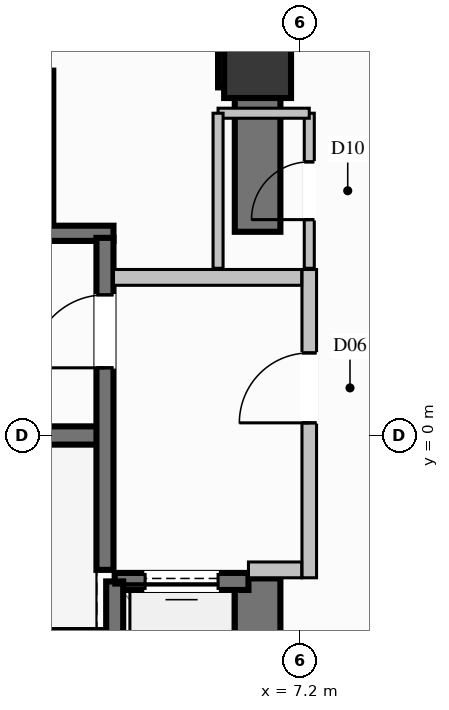
"""IFC4 building model, lengths in metres.
Left out: names, types, materials, properties, quantities, classifications, styles, units other than length and angle.
Written with IfcOpenShell. Run it as: python <this file> out.ifc"""

import sys

from ifc_helpers import new_model, si_unit, direction, frame, frame_2d, origin, origin_2d, place, context, subcontext, project, spatial, rectangle, extrude, element, fill, save


model = new_model("IFC4")
c1 = context("Model", 3, precision=1e-05, world=origin(), true_north=direction((0.0, 1.0)))
c2 = subcontext(c1, "Body", "Model", "MODEL_VIEW")
j1 = project(units=[si_unit("LENGTHUNIT", "METRE"), si_unit("PLANEANGLEUNIT", "RADIAN")], contexts=[c1])
p1 = place(None, origin())
s1 = spatial("IfcSite", under=j1, at=p1, CompositionType="ELEMENT")
p2 = place(p1, origin())
s2 = spatial("IfcBuilding", under=s1, at=p2, CompositionType="ELEMENT")
p3 = place(p2, frame((0.0, 0.0, 28.4)))
s3 = spatial("IfcBuildingStorey", under=s2, at=p3, CompositionType="ELEMENT", Elevation=28.4)
p4 = place(p3, frame((6.5, 6.1, 0.0), z_axis=(0.0, 0.0, 1.0), x_axis=(1.0, 0.0, 0.0)))
e1 = element("IfcColumn", 1, at=p4, inside=s3, PredefinedType="COLUMN", context=c2, shape_type="SweptSolid", body=[
    extrude(rectangle(XDim=1.1, YDim=1.1, at=origin_2d()), origin(), (0.0, 0.0, 1.0), 3.6),
])
p5 = place(p3, frame((-3.99, 0.0, 0.0), z_axis=(0.0, 0.0, 1.0), x_axis=(1.0, 0.0, 0.0)))
e2 = element("IfcWall", 2, at=p5, inside=s3, PredefinedType="SHEAR", context=c2, shape_type="SweptSolid", body=[
    extrude(rectangle(XDim=7.98, YDim=0.3, at=frame_2d((3.99, 0.0))), origin(), (0.0, 0.0, 1.0), 3.6),
])
for number, where, z_axis, x_axis in (
    (3, (-4.13, -3.325, 0.0), (0.0, 0.0, 1.0), (1.0, 0.0, 0.0)),
    (4, (-4.13, 3.325, 0.0), (0.0, 0.0, 1.0), (1.0, 0.0, 0.0)),
):
    element("IfcWall", number, at=place(p3, frame(where, z_axis=z_axis, x_axis=x_axis)), inside=s3, PredefinedType="SOLIDWALL", context=c2, shape_type="SweptSolid", body=[
        extrude(rectangle(XDim=8.26, YDim=0.25, at=frame_2d((4.13, 0.0))), origin(), (0.0, 0.0, 1.0), 3.6),
    ])
p6 = place(p3, frame((5.85, 6.1, 0.0), z_axis=(0.0, 0.0, 1.0), x_axis=(1.0, 0.0, 0.0)))
e5 = element("IfcWall", 5, at=p6, inside=s3, PredefinedType="SHEAR", context=c2, shape_type="SweptSolid", body=[
    extrude(rectangle(XDim=0.275, YDim=0.75, at=frame_2d((0.137, 0.0))), origin(), (0.0, 0.0, 1.0), 3.6),
])
p7 = place(p3, frame((6.5, -6.475, 0.0), z_axis=(0.0, 0.0, 1.0), x_axis=(0.0, 1.0, 0.0)))
e6 = element("IfcWall", 6, at=p7, inside=s3, PredefinedType="SHEAR", context=c2, shape_type="SweptSolid", body=[
    extrude(rectangle(XDim=4.125, YDim=0.75, at=frame_2d((2.062, 0.0))), origin(), (0.0, 0.0, 1.0), 3.6),
])
p8 = place(p3, frame((6.5, 3.35, 0.0), z_axis=(0.0, 0.0, 1.0), x_axis=(0.0, 1.0, 0.0)))
e7 = element("IfcWall", 7, at=p8, inside=s3, PredefinedType="SHEAR", context=c2, shape_type="SweptSolid", body=[
    extrude(rectangle(XDim=3.125, YDim=0.75, at=frame_2d((1.562, 0.0))), origin(), (0.0, 0.0, 1.0), 3.6),
])
p9 = place(p3, frame((3.0, 3.5, 0.0), z_axis=(0.0, 0.0, 1.0), x_axis=(0.0, 1.0, 0.0)))
e8 = element("IfcWall", 8, at=p9, inside=s3, PredefinedType="SOLIDWALL", context=c2, shape_type="SweptSolid", body=[
    extrude(rectangle(XDim=2.5, YDim=0.28, at=frame_2d((1.25, 0.0))), origin(), (0.0, 0.0, 1.0), 3.34),
])
p10 = place(p3, frame((6.35, -2.4, 0.0), z_axis=(0.0, 0.0, 1.0), x_axis=(-1.0, 0.0, 0.0)))
e9 = element("IfcWall", 9, at=p10, inside=s3, PredefinedType="SOLIDWALL", context=c2, shape_type="SweptSolid", body=[
    extrude(rectangle(XDim=2.2, YDim=0.28, at=frame_2d((1.1, 0.0))), origin(), (0.0, 0.0, 1.0), 3.34),
])
p11 = place(p10, frame((0.5, 0.0, 0.0)))
e10 = element("IfcOpeningElement", 10, at=p11, cuts=e9, PredefinedType="OPENING", context=c2, shape_type="SweptSolid", body=[
    extrude(rectangle(XDim=1.2, YDim=2.2, at=frame_2d((0.6, 1.1))), frame((0.0, 0.15, 0.0), z_axis=(0.0, -1.0, 0.0), x_axis=(1.0, 0.0, 0.0)), (0.0, 0.0, 1.0), 0.3),
])
p12 = place(p3, frame((4.15, -2.4, 0.0), z_axis=(0.0, 0.0, 1.0), x_axis=(0.0, -1.0, 0.0)))
e11 = element("IfcWall", 11, at=p12, inside=s3, PredefinedType="SOLIDWALL", context=c2, shape_type="SweptSolid", body=[
    extrude(rectangle(XDim=2.7, YDim=0.28, at=frame_2d((1.35, 0.0))), origin(), (0.0, 0.0, 1.0), 3.34),
])
p13 = place(p3, frame((3.99, -2.21, 0.0), z_axis=(0.0, 0.0, 1.0), x_axis=(0.0, 1.0, 0.0)))
e12 = element("IfcWall", 12, at=p13, inside=s3, PredefinedType="SOLIDWALL", context=c2, shape_type="SweptSolid", body=[
    extrude(rectangle(XDim=5.46, YDim=0.28, at=frame_2d((2.73, 0.0))), origin(), (0.0, 0.0, 1.0), 3.34),
])
p14 = place(p13, frame((3.323, 0.0, 0.0)))
e13 = element("IfcOpeningElement", 13, at=p14, cuts=e12, PredefinedType="OPENING", context=c2, shape_type="SweptSolid", body=[
    extrude(rectangle(XDim=1.2, YDim=2.2, at=frame_2d((0.6, 1.1))), frame((0.0, 0.15, 0.0), z_axis=(0.0, -1.0, 0.0), x_axis=(1.0, 0.0, 0.0)), (0.0, 0.0, 1.0), 0.3),
])
p15 = place(p3, frame((7.35, -2.34, 0.0), z_axis=(0.0, 0.0, 1.0), x_axis=(0.0, 1.0, 0.0)))
e14 = element("IfcWall", 14, at=p15, inside=s3, PredefinedType="PARTITIONING", context=c2, shape_type="SweptSolid", body=[
    extrude(rectangle(XDim=5.07, YDim=0.24, at=frame_2d((2.535, 0.0))), origin(), (0.0, 0.0, 1.0), 2.425),
])
p16 = place(p15, frame((2.548, 0.0, 0.0)))
e15 = element("IfcOpeningElement", 15, at=p16, cuts=e14, PredefinedType="OPENING", context=c2, shape_type="SweptSolid", body=[
    extrude(rectangle(XDim=1.15, YDim=2.2, at=frame_2d((0.575, 1.1))), frame((0.0, 0.13, 0.0), z_axis=(0.0, -1.0, 0.0), x_axis=(1.0, 0.0, 0.0)), (0.0, 0.0, 1.0), 0.26),
])
p17 = place(p3, frame((6.35, -2.21, 0.0), z_axis=(0.0, 0.0, 1.0), x_axis=(1.0, 0.0, 0.0)))
e16 = element("IfcWall", 16, at=p17, inside=s3, PredefinedType="PARTITIONING", context=c2, shape_type="SweptSolid", body=[
    extrude(rectangle(XDim=0.875, YDim=0.26, at=frame_2d((0.438, 0.0))), origin(), (0.0, 0.0, 1.0), 3.34),
])
p18 = place(p3, frame((4.13, 2.6, 0.0), z_axis=(0.0, 0.0, 1.0), x_axis=(1.0, 0.0, 0.0)))
e17 = element("IfcWall", 17, at=p18, inside=s3, PredefinedType="PARTITIONING", context=c2, shape_type="SweptSolid", body=[
    extrude(rectangle(XDim=3.095, YDim=0.26, at=frame_2d((1.548, 0.0))), origin(), (0.0, 0.0, 1.0), 3.34),
])
p19 = place(p3, frame((7.35, 2.75, 0.0), z_axis=(0.0, 0.0, 1.0), x_axis=(0.0, 1.0, 0.0)))
e18 = element("IfcWall", 18, at=p19, inside=s3, PredefinedType="PARTITIONING", context=c2, shape_type="SweptSolid", body=[
    extrude(rectangle(XDim=2.55, YDim=0.165, at=frame_2d((1.275, 0.0))), origin(), (0.0, 0.0, 1.0), 3.34),
])
p20 = place(p19, frame((0.8, 0.0, 0.0)))
e19 = element("IfcOpeningElement", 19, at=p20, cuts=e18, PredefinedType="OPENING", context=c2, shape_type="SweptSolid", body=[
    extrude(rectangle(XDim=0.95, YDim=2.1, at=frame_2d((0.475, 1.05))), frame((0.0, 0.093, 0.0), z_axis=(0.0, -1.0, 0.0), x_axis=(1.0, 0.0, 0.0)), (0.0, 0.0, 1.0), 0.185),
])
p21 = place(p3, frame((7.35, 5.3, 0.0), z_axis=(0.0, 0.0, 1.0), x_axis=(-1.0, 0.0, 0.0)))
e20 = element("IfcWall", 20, at=p21, inside=s3, PredefinedType="PARTITIONING", context=c2, shape_type="SweptSolid", body=[
    extrude(rectangle(XDim=1.5, YDim=0.165, at=frame_2d((0.75, 0.0))), origin(), (0.0, 0.0, 1.0), 2.425),
])
p22 = place(p3, frame((5.85, 5.3, 0.0), z_axis=(0.0, 0.0, 1.0), x_axis=(0.0, -1.0, 0.0)))
e21 = element("IfcWall", 21, at=p22, inside=s3, PredefinedType="PARTITIONING", context=c2, shape_type="SweptSolid", body=[
    extrude(rectangle(XDim=2.55, YDim=0.165, at=frame_2d((1.275, 0.0))), origin(), (0.0, 0.0, 1.0), 2.425),
])
p23 = place(p3, frame((10.566, 5.975, 0.0), z_axis=(0.0, 0.0, 1.0), x_axis=(-0.714411174131, 0.699726142342, 0.0)))
e22 = element("IfcWall", 22, at=p23, inside=s3, PredefinedType="PARTITIONING", context=c2, shape_type="SweptSolid", body=[
    extrude(rectangle(XDim=6.251, YDim=0.24, at=frame_2d((3.125, 0.0))), origin(), (0.0, 0.0, 1.0), 3.34),
])
p24 = place(p11, origin())
e23 = element("IfcDoor", 23, at=p24, inside=s3, OperationType="SLIDING_TO_LEFT", PredefinedType="DOOR", context=c2, shape_type="SweptSolid", body=[
    extrude(rectangle(XDim=1.2, YDim=2.2, at=frame_2d((0.6, 1.1))), frame((0.0, 0.025, 0.0), z_axis=(0.0, -1.0, 0.0), x_axis=(1.0, 0.0, 0.0)), (0.0, 0.0, 1.0), 0.05),
])
fill(e10, e23)
p25 = place(p14, origin())
e24 = element("IfcDoor", 24, at=p25, inside=s3, OperationType="SINGLE_SWING_LEFT", PredefinedType="DOOR", context=c2, shape_type="SweptSolid", body=[
    extrude(rectangle(XDim=1.2, YDim=2.2, at=frame_2d((0.6, 1.1))), frame((0.0, 0.025, 0.0), z_axis=(0.0, -1.0, 0.0), x_axis=(1.0, 0.0, 0.0)), (0.0, 0.0, 1.0), 0.05),
])
fill(e13, e24)
p26 = place(p16, origin())
e25 = element("IfcDoor", 25, at=p26, inside=s3, OperationType="SINGLE_SWING_LEFT", PredefinedType="DOOR", context=c2, shape_type="SweptSolid", body=[
    extrude(rectangle(XDim=1.15, YDim=2.2, at=frame_2d((0.575, 1.1))), frame((0.0, 0.025, 0.0), z_axis=(0.0, -1.0, 0.0), x_axis=(1.0, 0.0, 0.0)), (0.0, 0.0, 1.0), 0.05),
])
fill(e15, e25)
p27 = place(p20, origin())
e26 = element("IfcDoor", 26, at=p27, inside=s3, OperationType="SINGLE_SWING_LEFT", PredefinedType="DOOR", context=c2, shape_type="SweptSolid", body=[
    extrude(rectangle(XDim=0.95, YDim=2.1, at=frame_2d((0.475, 1.05))), frame((0.0, 0.025, 0.0), z_axis=(0.0, -1.0, 0.0), x_axis=(1.0, 0.0, 0.0)), (0.0, 0.0, 1.0), 0.05),
])
fill(e19, e26)
save(model, sys.argv[1])
